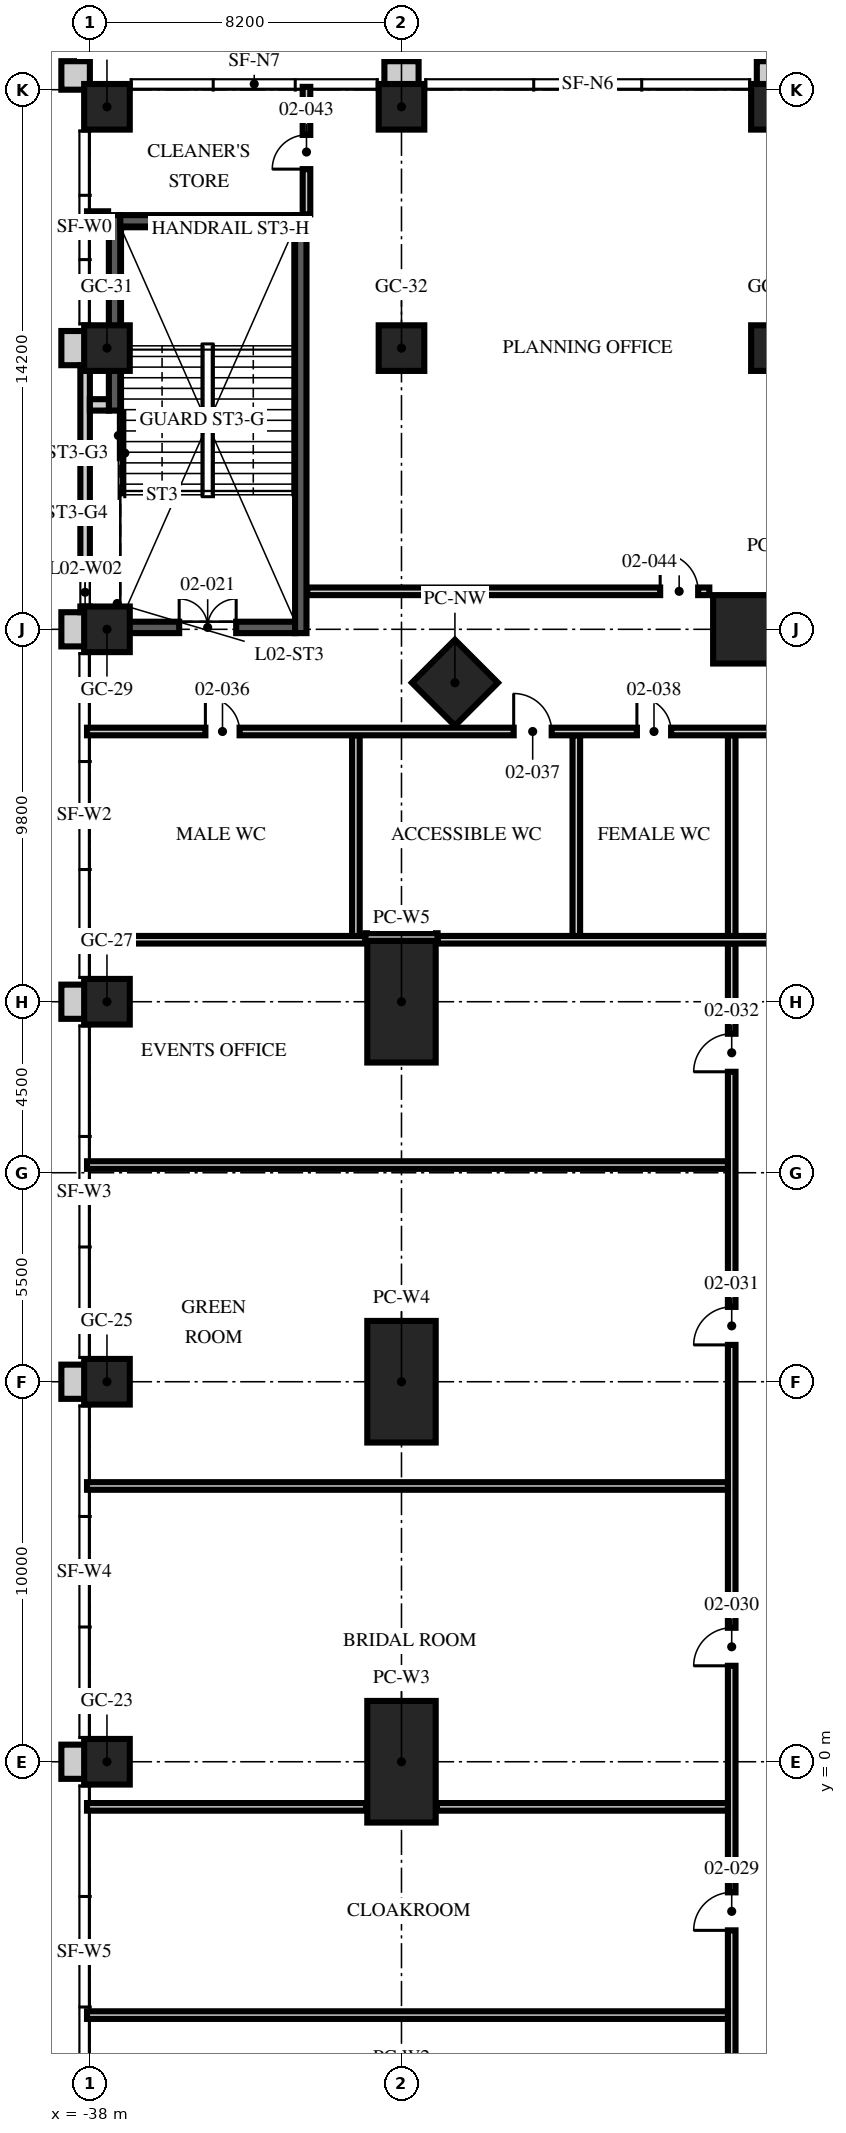
"""IFC4 building model, lengths in metres.
Left out: names, types, materials, properties, quantities, classifications, styles, units other than length and angle.
Written with IfcOpenShell. Run it as: python <this file> out.ifc"""

import sys

from ifc_helpers import new_model, si_unit, direction, frame, frame_2d, origin, origin_2d, place, context, subcontext, project, spatial, rectangle, hollow_rectangle, extrude, element, fill, save


model = new_model("IFC4")
c1 = context("Model", 3, precision=1e-05, world=origin(), true_north=direction((0.0, 1.0)))
c2 = subcontext(c1, "Body", "Model", "MODEL_VIEW")
j1 = project(units=[si_unit("LENGTHUNIT", "METRE"), si_unit("PLANEANGLEUNIT", "RADIAN")], contexts=[c1])
p1 = place(None, origin())
s1 = spatial("IfcSite", under=j1, at=p1, CompositionType="ELEMENT")
p2 = place(p1, origin())
s2 = spatial("IfcBuilding", under=s1, at=p2, CompositionType="ELEMENT")
p3 = place(p2, frame((0.0, 0.0, 11.0)))
s3 = spatial("IfcBuildingStorey", under=s2, at=p3, CompositionType="ELEMENT", Elevation=11.0)
for number, where, z_axis, x_axis in (
    (1, (-20.0, 29.8, 0.0), (0.0, 0.0, 1.0), (1.0, 0.0, 0.0)),
    (2, (-29.8, 0.0, 0.0), (0.0, 0.0, 1.0), (0.0, 1.0, 0.0)),
    (3, (-29.8, 10.0, 0.0), (0.0, 0.0, 1.0), (0.0, 1.0, 0.0)),
    (4, (-29.8, 20.0, 0.0), (0.0, 0.0, 1.0), (0.0, 1.0, 0.0)),
):
    element("IfcColumn", number, at=place(p3, frame(where, z_axis=z_axis, x_axis=x_axis)), inside=s3, PredefinedType="COLUMN", context=c2, shape_type="SweptSolid", body=[
        extrude(hollow_rectangle(XDim=3.2, YDim=1.8, WallThickness=0.2, at=origin_2d()), origin(), (0.0, 0.0, 1.0), 5.0),
    ])
p4 = place(p3, frame((-28.394, 28.394, 0.0), z_axis=(0.0, 0.0, 1.0), x_axis=(0.707106781187, 0.707106781187, 0.0)))
e5 = element("IfcColumn", 5, at=p4, inside=s3, PredefinedType="COLUMN", context=c2, shape_type="SweptSolid", body=[
    extrude(hollow_rectangle(XDim=1.6, YDim=1.6, WallThickness=0.1, at=origin_2d()), origin(), (0.0, 0.0, 1.0), 5.0),
])
for number, where, z_axis, x_axis in (
    (6, (-37.55, 0.0, 0.0), (0.0, 0.0, 1.0), (1.0, 0.0, 0.0)),
    (7, (-37.55, 10.0, 0.0), (0.0, 0.0, 1.0), (1.0, 0.0, 0.0)),
    (8, (-37.55, 20.0, 0.0), (0.0, 0.0, 1.0), (1.0, 0.0, 0.0)),
    (9, (-37.55, 29.8, 0.0), (0.0, 0.0, 1.0), (1.0, 0.0, 0.0)),
    (10, (-37.55, 37.2, 0.0), (0.0, 0.0, 1.0), (1.0, 0.0, 0.0)),
    (11, (-29.8, 37.2, 0.0), (0.0, 0.0, 1.0), (1.0, 0.0, 0.0)),
    (12, (-20.0, 37.2, 0.0), (0.0, 0.0, 1.0), (1.0, 0.0, 0.0)),
    (13, (-37.55, 43.55, 0.0), (0.0, 0.0, 1.0), (1.0, 0.0, 0.0)),
    (14, (-29.8, 43.55, 0.0), (0.0, 0.0, 1.0), (1.0, 0.0, 0.0)),
    (15, (-20.0, 43.55, 0.0), (0.0, 0.0, 1.0), (1.0, 0.0, 0.0)),
):
    element("IfcColumn", number, at=place(p3, frame(where, z_axis=z_axis, x_axis=x_axis)), inside=s3, PredefinedType="COLUMN", context=c2, shape_type="SweptSolid", body=[
        extrude(rectangle(XDim=1.2, YDim=1.2, at=origin_2d()), origin(), (0.0, 0.0, 1.0), 5.0),
    ])
for number, where, z_axis, x_axis in (
    (16, (-19.55, 44.375, 0.0), (0.0, 0.0, 1.0), (-1.0, 0.0, 0.0)),
    (17, (-29.35, 44.375, 0.0), (0.0, 0.0, 1.0), (-1.0, 0.0, 0.0)),
):
    element("IfcWall", number, at=place(p3, frame(where, z_axis=z_axis, x_axis=x_axis)), inside=s3, PredefinedType="SOLIDWALL", context=c2, shape_type="SweptSolid", body=[
        extrude(rectangle(XDim=0.9, YDim=0.75, at=frame_2d((0.45, 0.0))), origin(), (0.0, 0.0, 1.0), 5.0),
    ])
p5 = place(p3, frame((-38.0, 44.375, 0.0), z_axis=(0.0, 0.0, 1.0), x_axis=(-1.0, 0.0, 0.0)))
e18 = element("IfcWall", 18, at=p5, inside=s3, PredefinedType="SOLIDWALL", context=c2, shape_type="SweptSolid", body=[
    extrude(rectangle(XDim=0.75, YDim=0.75, at=frame_2d((0.375, 0.0))), origin(), (0.0, 0.0, 1.0), 5.0),
])
for number, where, z_axis, x_axis in (
    (19, (-38.375, 37.65, 0.0), (0.0, 0.0, 1.0), (0.0, -1.0, 0.0)),
    (20, (-38.375, 30.25, 0.0), (0.0, 0.0, 1.0), (0.0, -1.0, 0.0)),
    (21, (-38.375, 20.45, 0.0), (0.0, 0.0, 1.0), (0.0, -1.0, 0.0)),
    (22, (-38.375, 10.45, 0.0), (0.0, 0.0, 1.0), (0.0, -1.0, 0.0)),
    (23, (-38.375, 0.45, 0.0), (0.0, 0.0, 1.0), (0.0, -1.0, 0.0)),
):
    element("IfcWall", number, at=place(p3, frame(where, z_axis=z_axis, x_axis=x_axis)), inside=s3, PredefinedType="SOLIDWALL", context=c2, shape_type="SweptSolid", body=[
        extrude(rectangle(XDim=0.9, YDim=0.75, at=frame_2d((0.45, 0.0))), origin(), (0.0, 0.0, 1.0), 5.0),
    ])
p6 = place(p3, frame((-38.125, 36.75, 0.0), z_axis=(0.0, 0.0, 1.0), x_axis=(0.0, -1.0, 0.0)))
e24 = element("IfcWall", 24, at=p6, inside=s3, PredefinedType="SOLIDWALL", context=c2, shape_type="SweptSolid", body=[
    extrude(rectangle(XDim=6.5, YDim=0.25, at=frame_2d((3.25, 0.0))), origin(), (0.0, 0.0, 1.0), 5.0),
])
p7 = place(p6, frame((5.6, 0.0, 1.2)))
e25 = element("IfcOpeningElement", 25, at=p7, cuts=e24, PredefinedType="OPENING", context=c2, shape_type="SweptSolid", body=[
    extrude(rectangle(XDim=0.75, YDim=1.7, at=frame_2d((0.375, 0.85))), frame((0.0, 0.135, 0.0), z_axis=(0.0, -1.0, 0.0), x_axis=(1.0, 0.0, 0.0)), (0.0, 0.0, 1.0), 0.27),
])
p8 = place(p3, frame((-37.35, 35.556, 0.0), z_axis=(0.0, 0.0, 1.0), x_axis=(0.0, 1.0, 0.0)))
e26 = element("IfcWall", 26, at=p8, inside=s3, PredefinedType="SOLIDWALL", context=c2, shape_type="SweptSolid", body=[
    extrude(rectangle(XDim=5.144, YDim=0.3, at=frame_2d((2.572, 0.0))), origin(), (0.0, 0.0, 1.0), 4.7),
])
p9 = place(p3, frame((-38.0, 35.706, 0.0), z_axis=(0.0, 0.0, 1.0), x_axis=(1.0, 0.0, 0.0)))
e27 = element("IfcWall", 27, at=p9, inside=s3, PredefinedType="PARTITIONING", context=c2, shape_type="SweptSolid", body=[
    extrude(rectangle(XDim=0.5, YDim=0.3, at=frame_2d((0.25, 0.0))), origin(), (0.0, 0.0, 1.0), 3.27),
])
p10 = place(p3, frame((-38.0, 29.85, 0.0), z_axis=(0.0, 0.0, 1.0), x_axis=(1.0, 0.0, 0.0)))
e28 = element("IfcWall", 28, at=p10, inside=s3, PredefinedType="SOLIDWALL", context=c2, shape_type="SweptSolid", body=[
    extrude(rectangle(XDim=5.4, YDim=0.3, at=frame_2d((2.7, 0.0))), origin(), (0.0, 0.0, 1.0), 4.7),
])
p11 = place(p10, frame((2.35, 0.0, 0.0)))
e29 = element("IfcOpeningElement", 29, at=p11, cuts=e28, PredefinedType="OPENING", context=c2, shape_type="SweptSolid", body=[
    extrude(rectangle(XDim=1.5, YDim=2.1, at=frame_2d((0.75, 1.05))), frame((0.0, 0.16, 0.0), z_axis=(0.0, -1.0, 0.0), x_axis=(1.0, 0.0, 0.0)), (0.0, 0.0, 1.0), 0.32),
])
p12 = place(p3, frame((-32.45, 29.7, 0.0), z_axis=(0.0, 0.0, 1.0), x_axis=(0.0, 1.0, 0.0)))
e30 = element("IfcWall", 30, at=p12, inside=s3, PredefinedType="SOLIDWALL", context=c2, shape_type="SweptSolid", body=[
    extrude(rectangle(XDim=11.0, YDim=0.3, at=frame_2d((5.5, 0.0))), origin(), (0.0, 0.0, 1.0), 4.7),
])
p13 = place(p3, frame((-37.2, 40.55, 0.0), z_axis=(0.0, 0.0, 1.0), x_axis=(1.0, 0.0, 0.0)))
e31 = element("IfcWall", 31, at=p13, inside=s3, PredefinedType="SOLIDWALL", context=c2, shape_type="SweptSolid", body=[
    extrude(rectangle(XDim=4.6, YDim=0.3, at=frame_2d((2.3, 0.0))), origin(), (0.0, 0.0, 1.0), 4.7),
])
p14 = place(p3, frame((-21.111, -20.491, 0.0), z_axis=(0.0, 0.0, 1.0), x_axis=(0.0, 1.0, 0.0)))
e32 = element("IfcWall", 32, at=p14, inside=s3, PredefinedType="SOLIDWALL", context=c2, shape_type="SweptSolid", body=[
    extrude(rectangle(XDim=42.022, YDim=0.2, at=frame_2d((21.011, 0.0))), origin(), (0.0, 0.0, 1.0), 3.5),
])
p15 = place(p14, frame((6.352, 0.0, 0.0)))
e33 = element("IfcOpeningElement", 33, at=p15, cuts=e32, PredefinedType="OPENING", context=c2, shape_type="SweptSolid", body=[
    extrude(rectangle(XDim=1.0, YDim=2.1, at=frame_2d((0.5, 1.05))), frame((0.0, 0.11, 0.0), z_axis=(0.0, -1.0, 0.0), x_axis=(1.0, 0.0, 0.0)), (0.0, 0.0, 1.0), 0.22),
])
p16 = place(p14, frame((16.054, 0.0, 0.0)))
e34 = element("IfcOpeningElement", 34, at=p16, cuts=e32, PredefinedType="OPENING", context=c2, shape_type="SweptSolid", body=[
    extrude(rectangle(XDim=1.0, YDim=2.1, at=frame_2d((0.5, 1.05))), frame((0.0, 0.11, 0.0), z_axis=(0.0, -1.0, 0.0), x_axis=(1.0, 0.0, 0.0)), (0.0, 0.0, 1.0), 0.22),
])
p17 = place(p14, frame((23.016, 0.0, 0.0)))
e35 = element("IfcOpeningElement", 35, at=p17, cuts=e32, PredefinedType="OPENING", context=c2, shape_type="SweptSolid", body=[
    extrude(rectangle(XDim=1.0, YDim=2.1, at=frame_2d((0.5, 1.05))), frame((0.0, 0.11, 0.0), z_axis=(0.0, -1.0, 0.0), x_axis=(1.0, 0.0, 0.0)), (0.0, 0.0, 1.0), 0.22),
])
p18 = place(p14, frame((31.46, 0.0, 0.0)))
e36 = element("IfcOpeningElement", 36, at=p18, cuts=e32, PredefinedType="OPENING", context=c2, shape_type="SweptSolid", body=[
    extrude(rectangle(XDim=1.0, YDim=2.1, at=frame_2d((0.5, 1.05))), frame((0.0, 0.11, 0.0), z_axis=(0.0, -1.0, 0.0), x_axis=(1.0, 0.0, 0.0)), (0.0, 0.0, 1.0), 0.22),
])
p19 = place(p14, frame((38.647, 0.0, 0.0)))
e37 = element("IfcOpeningElement", 37, at=p19, cuts=e32, PredefinedType="OPENING", context=c2, shape_type="SweptSolid", body=[
    extrude(rectangle(XDim=1.0, YDim=2.1, at=frame_2d((0.5, 1.05))), frame((0.0, 0.11, 0.0), z_axis=(0.0, -1.0, 0.0), x_axis=(1.0, 0.0, 0.0)), (0.0, 0.0, 1.0), 0.22),
])
p20 = place(p3, frame((-38.075, -6.667, 0.0), z_axis=(0.0, 0.0, 1.0), x_axis=(1.0, 0.0, 0.0)))
e38 = element("IfcWall", 38, at=p20, inside=s3, PredefinedType="SOLIDWALL", context=c2, shape_type="SweptSolid", body=[
    extrude(rectangle(XDim=16.864, YDim=0.2, at=frame_2d((8.432, 0.0))), origin(), (0.0, 0.0, 1.0), 3.7),
])
p21 = place(p3, frame((-38.075, -1.187, 0.0), z_axis=(0.0, 0.0, 1.0), x_axis=(1.0, 0.0, 0.0)))
e39 = element("IfcWall", 39, at=p21, inside=s3, PredefinedType="SOLIDWALL", context=c2, shape_type="SweptSolid", body=[
    extrude(rectangle(XDim=7.345, YDim=0.2, at=frame_2d((3.672, 0.0))), origin(), (0.0, 0.0, 1.0), 3.7),
])
p22 = place(p3, frame((-28.87, -1.187, 0.0), z_axis=(0.0, 0.0, 1.0), x_axis=(1.0, 0.0, 0.0)))
e40 = element("IfcWall", 40, at=p22, inside=s3, PredefinedType="SOLIDWALL", context=c2, shape_type="SweptSolid", body=[
    extrude(rectangle(XDim=7.659, YDim=0.2, at=frame_2d((3.83, 0.0))), origin(), (0.0, 0.0, 1.0), 4.7),
])
for number, where, z_axis, x_axis in (
    (41, (-38.075, 7.257, 0.0), (0.0, 0.0, 1.0), (1.0, 0.0, 0.0)),
    (42, (-38.075, 15.702, 0.0), (0.0, 0.0, 1.0), (1.0, 0.0, 0.0)),
):
    element("IfcWall", number, at=place(p3, frame(where, z_axis=z_axis, x_axis=x_axis)), inside=s3, PredefinedType="SOLIDWALL", context=c2, shape_type="SweptSolid", body=[
        extrude(rectangle(XDim=16.864, YDim=0.2, at=frame_2d((8.432, 0.0))), origin(), (0.0, 0.0, 1.0), 3.7),
    ])
p23 = place(p3, frame((-38.075, 21.631, 0.0), z_axis=(0.0, 0.0, 1.0), x_axis=(1.0, 0.0, 0.0)))
e43 = element("IfcWall", 43, at=p23, inside=s3, PredefinedType="SOLIDWALL", context=c2, shape_type="SweptSolid", body=[
    extrude(rectangle(XDim=7.325, YDim=0.2, at=frame_2d((3.663, 0.0))), origin(), (0.0, 0.0, 1.0), 3.7),
])
p24 = place(p3, frame((-28.85, 21.631, 0.0), z_axis=(0.0, 0.0, 1.0), x_axis=(1.0, 0.0, 0.0)))
e44 = element("IfcWall", 44, at=p24, inside=s3, PredefinedType="SOLIDWALL", context=c2, shape_type="SweptSolid", body=[
    extrude(rectangle(XDim=26.95, YDim=0.2, at=frame_2d((13.475, 0.0))), origin(), (0.0, 0.0, 1.0), 3.5),
])
p25 = place(p3, frame((-30.75, 21.702, 0.0), z_axis=(0.0, 0.0, 1.0), x_axis=(1.0, 0.0, 0.0)))
e45 = element("IfcWall", 45, at=p25, inside=s3, PredefinedType="SOLIDWALL", context=c2, shape_type="SweptSolid", body=[
    extrude(rectangle(XDim=1.9, YDim=0.2, at=frame_2d((0.95, 0.0))), origin(), (0.0, 0.0, 1.0), 3.7),
])
p26 = place(p3, frame((-31.0, 21.731, 0.0), z_axis=(0.0, 0.0, 1.0), x_axis=(0.0, 1.0, 0.0)))
e46 = element("IfcWall", 46, at=p26, inside=s3, PredefinedType="SOLIDWALL", context=c2, shape_type="SweptSolid", body=[
    extrude(rectangle(XDim=5.28, YDim=0.2, at=frame_2d((2.64, 0.0))), origin(), (0.0, 0.0, 1.0), 4.7),
])
p27 = place(p3, frame((-25.2, 21.731, 0.0), z_axis=(0.0, 0.0, 1.0), x_axis=(0.0, 1.0, 0.0)))
e47 = element("IfcWall", 47, at=p27, inside=s3, PredefinedType="SOLIDWALL", context=c2, shape_type="SweptSolid", body=[
    extrude(rectangle(XDim=5.28, YDim=0.2, at=frame_2d((2.64, 0.0))), origin(), (0.0, 0.0, 1.0), 3.5),
])
p28 = place(p3, frame((-21.111, 21.731, 0.0), z_axis=(0.0, 0.0, 1.0), x_axis=(0.0, 1.0, 0.0)))
e48 = element("IfcWall", 48, at=p28, inside=s3, PredefinedType="SOLIDWALL", context=c2, shape_type="SweptSolid", body=[
    extrude(rectangle(XDim=5.28, YDim=0.2, at=frame_2d((2.64, 0.0))), origin(), (0.0, 0.0, 1.0), 4.7),
])
p29 = place(p3, frame((-38.075, 27.111, 0.0), z_axis=(0.0, 0.0, 1.0), x_axis=(1.0, 0.0, 0.0)))
e49 = element("IfcWall", 49, at=p29, inside=s3, PredefinedType="SOLIDWALL", context=c2, shape_type="SweptSolid", body=[
    extrude(rectangle(XDim=36.175, YDim=0.2, at=frame_2d((18.087, 0.0))), origin(), (0.0, 0.0, 1.0), 3.5),
])
p30 = place(p29, frame((3.115, 0.0, 0.0)))
e50 = element("IfcOpeningElement", 50, at=p30, cuts=e49, PredefinedType="OPENING", context=c2, shape_type="SweptSolid", body=[
    extrude(rectangle(XDim=0.9, YDim=2.1, at=frame_2d((0.45, 1.05))), frame((0.0, 0.11, 0.0), z_axis=(0.0, -1.0, 0.0), x_axis=(1.0, 0.0, 0.0)), (0.0, 0.0, 1.0), 0.22),
])
p31 = place(p29, frame((11.227, 0.0, 0.0)))
e51 = element("IfcOpeningElement", 51, at=p31, cuts=e49, PredefinedType="OPENING", context=c2, shape_type="SweptSolid", body=[
    extrude(rectangle(XDim=1.0, YDim=2.1, at=frame_2d((0.5, 1.05))), frame((0.0, 0.11, 0.0), z_axis=(0.0, -1.0, 0.0), x_axis=(1.0, 0.0, 0.0)), (0.0, 0.0, 1.0), 0.22),
])
p32 = place(p29, frame((14.469, 0.0, 0.0)))
e52 = element("IfcOpeningElement", 52, at=p32, cuts=e49, PredefinedType="OPENING", context=c2, shape_type="SweptSolid", body=[
    extrude(rectangle(XDim=0.9, YDim=2.1, at=frame_2d((0.45, 1.05))), frame((0.0, 0.11, 0.0), z_axis=(0.0, -1.0, 0.0), x_axis=(1.0, 0.0, 0.0)), (0.0, 0.0, 1.0), 0.22),
])
p33 = place(p3, frame((-32.28, 30.8, 0.0), z_axis=(0.0, 0.0, 1.0), x_axis=(1.0, 0.0, 0.0)))
e53 = element("IfcWall", 53, at=p33, inside=s3, PredefinedType="SOLIDWALL", context=c2, shape_type="SweptSolid", body=[
    extrude(rectangle(XDim=10.58, YDim=0.2, at=frame_2d((5.29, 0.0))), origin(), (0.0, 0.0, 1.0), 4.7),
])
p34 = place(p33, frame((9.287, 0.0, 0.0)))
e54 = element("IfcOpeningElement", 54, at=p34, cuts=e53, PredefinedType="OPENING", context=c2, shape_type="SweptSolid", body=[
    extrude(rectangle(XDim=1.0, YDim=2.1, at=frame_2d((0.5, 1.05))), frame((0.0, 0.11, 0.0), z_axis=(0.0, -1.0, 0.0), x_axis=(1.0, 0.0, 0.0)), (0.0, 0.0, 1.0), 0.22),
])
p35 = place(p3, frame((-38.075, 40.7, 0.0), z_axis=(0.0, 0.0, 1.0), x_axis=(1.0, 0.0, 0.0)))
e55 = element("IfcWall", 55, at=p35, inside=s3, PredefinedType="SOLIDWALL", context=c2, shape_type="SweptSolid", body=[
    extrude(rectangle(XDim=0.555, YDim=0.2, at=frame_2d((0.277, 0.0))), origin(), (0.0, 0.0, 1.0), 3.27),
])
p36 = place(p3, frame((-32.3, 40.72, 0.0), z_axis=(0.0, 0.0, 1.0), x_axis=(0.0, 1.0, 0.0)))
e56 = element("IfcWall", 56, at=p36, inside=s3, PredefinedType="SOLIDWALL", context=c2, shape_type="SweptSolid", body=[
    extrude(rectangle(XDim=3.355, YDim=0.2, at=frame_2d((1.677, 0.0))), origin(), (0.0, 0.0, 1.0), 3.7),
])
p37 = place(p36, frame((1.19, 0.0, 0.0)))
e57 = element("IfcOpeningElement", 57, at=p37, cuts=e56, PredefinedType="OPENING", context=c2, shape_type="SweptSolid", body=[
    extrude(rectangle(XDim=0.9, YDim=2.1, at=frame_2d((0.45, 1.05))), frame((0.0, 0.11, 0.0), z_axis=(0.0, -1.0, 0.0), x_axis=(1.0, 0.0, 0.0)), (0.0, 0.0, 1.0), 0.22),
])
p38 = place(p7, origin())
e58 = element("IfcWindow", 58, at=p38, inside=s3, PartitioningType="SINGLE_PANEL", PredefinedType="WINDOW", context=c2, shape_type="SweptSolid", body=[
    extrude(rectangle(XDim=0.75, YDim=1.7, at=frame_2d((0.375, 0.85))), frame((0.0, 0.03, 0.0), z_axis=(0.0, -1.0, 0.0), x_axis=(1.0, 0.0, 0.0)), (0.0, 0.0, 1.0), 0.06),
])
fill(e25, e58)
p39 = place(p11, origin())
e59 = element("IfcDoor", 59, at=p39, inside=s3, OperationType="DOUBLE_DOOR_SINGLE_SWING", PredefinedType="DOOR", context=c2, shape_type="SweptSolid", body=[
    extrude(rectangle(XDim=1.5, YDim=2.1, at=frame_2d((0.75, 1.05))), frame((0.0, 0.025, 0.0), z_axis=(0.0, -1.0, 0.0), x_axis=(1.0, 0.0, 0.0)), (0.0, 0.0, 1.0), 0.05),
])
fill(e29, e59)
p40 = place(p16, origin())
e60 = element("IfcDoor", 60, at=p40, inside=s3, OperationType="SINGLE_SWING_LEFT", PredefinedType="DOOR", context=c2, shape_type="SweptSolid", body=[
    extrude(rectangle(XDim=1.0, YDim=2.1, at=frame_2d((0.5, 1.05))), frame((0.0, 0.025, 0.0), z_axis=(0.0, -1.0, 0.0), x_axis=(1.0, 0.0, 0.0)), (0.0, 0.0, 1.0), 0.05),
])
fill(e34, e60)
p41 = place(p17, origin())
e61 = element("IfcDoor", 61, at=p41, inside=s3, OperationType="SINGLE_SWING_LEFT", PredefinedType="DOOR", context=c2, shape_type="SweptSolid", body=[
    extrude(rectangle(XDim=1.0, YDim=2.1, at=frame_2d((0.5, 1.05))), frame((0.0, 0.025, 0.0), z_axis=(0.0, -1.0, 0.0), x_axis=(1.0, 0.0, 0.0)), (0.0, 0.0, 1.0), 0.05),
])
fill(e35, e61)
p42 = place(p18, origin())
e62 = element("IfcDoor", 62, at=p42, inside=s3, OperationType="SINGLE_SWING_LEFT", PredefinedType="DOOR", context=c2, shape_type="SweptSolid", body=[
    extrude(rectangle(XDim=1.0, YDim=2.1, at=frame_2d((0.5, 1.05))), frame((0.0, 0.025, 0.0), z_axis=(0.0, -1.0, 0.0), x_axis=(1.0, 0.0, 0.0)), (0.0, 0.0, 1.0), 0.05),
])
fill(e36, e62)
p43 = place(p19, origin())
e63 = element("IfcDoor", 63, at=p43, inside=s3, OperationType="SINGLE_SWING_LEFT", PredefinedType="DOOR", context=c2, shape_type="SweptSolid", body=[
    extrude(rectangle(XDim=1.0, YDim=2.1, at=frame_2d((0.5, 1.05))), frame((0.0, 0.025, 0.0), z_axis=(0.0, -1.0, 0.0), x_axis=(1.0, 0.0, 0.0)), (0.0, 0.0, 1.0), 0.05),
])
fill(e37, e63)
p44 = place(p30, origin())
e64 = element("IfcDoor", 64, at=p44, inside=s3, OperationType="SINGLE_SWING_LEFT", PredefinedType="DOOR", context=c2, shape_type="SweptSolid", body=[
    extrude(rectangle(XDim=0.9, YDim=2.1, at=frame_2d((0.45, 1.05))), frame((0.0, 0.025, 0.0), z_axis=(0.0, -1.0, 0.0), x_axis=(1.0, 0.0, 0.0)), (0.0, 0.0, 1.0), 0.05),
])
fill(e50, e64)
p45 = place(p31, origin())
e65 = element("IfcDoor", 65, at=p45, inside=s3, OperationType="SINGLE_SWING_LEFT", PredefinedType="DOOR", context=c2, shape_type="SweptSolid", body=[
    extrude(rectangle(XDim=1.0, YDim=2.1, at=frame_2d((0.5, 1.05))), frame((0.0, 0.025, 0.0), z_axis=(0.0, -1.0, 0.0), x_axis=(1.0, 0.0, 0.0)), (0.0, 0.0, 1.0), 0.05),
])
fill(e51, e65)
p46 = place(p32, origin())
e66 = element("IfcDoor", 66, at=p46, inside=s3, OperationType="SINGLE_SWING_LEFT", PredefinedType="DOOR", context=c2, shape_type="SweptSolid", body=[
    extrude(rectangle(XDim=0.9, YDim=2.1, at=frame_2d((0.45, 1.05))), frame((0.0, 0.025, 0.0), z_axis=(0.0, -1.0, 0.0), x_axis=(1.0, 0.0, 0.0)), (0.0, 0.0, 1.0), 0.05),
])
fill(e52, e66)
p47 = place(p37, origin())
e67 = element("IfcDoor", 67, at=p47, inside=s3, OperationType="SINGLE_SWING_LEFT", PredefinedType="DOOR", context=c2, shape_type="SweptSolid", body=[
    extrude(rectangle(XDim=0.9, YDim=2.1, at=frame_2d((0.45, 1.05))), frame((0.0, 0.025, 0.0), z_axis=(0.0, -1.0, 0.0), x_axis=(1.0, 0.0, 0.0)), (0.0, 0.0, 1.0), 0.05),
])
fill(e57, e67)
p48 = place(p34, origin())
e68 = element("IfcDoor", 68, at=p48, inside=s3, OperationType="SINGLE_SWING_LEFT", PredefinedType="DOOR", context=c2, shape_type="SweptSolid", body=[
    extrude(rectangle(XDim=1.0, YDim=2.1, at=frame_2d((0.5, 1.05))), frame((0.0, 0.025, 0.0), z_axis=(0.0, -1.0, 0.0), x_axis=(1.0, 0.0, 0.0)), (0.0, 0.0, 1.0), 0.05),
])
fill(e54, e68)
save(model, sys.argv[1])
